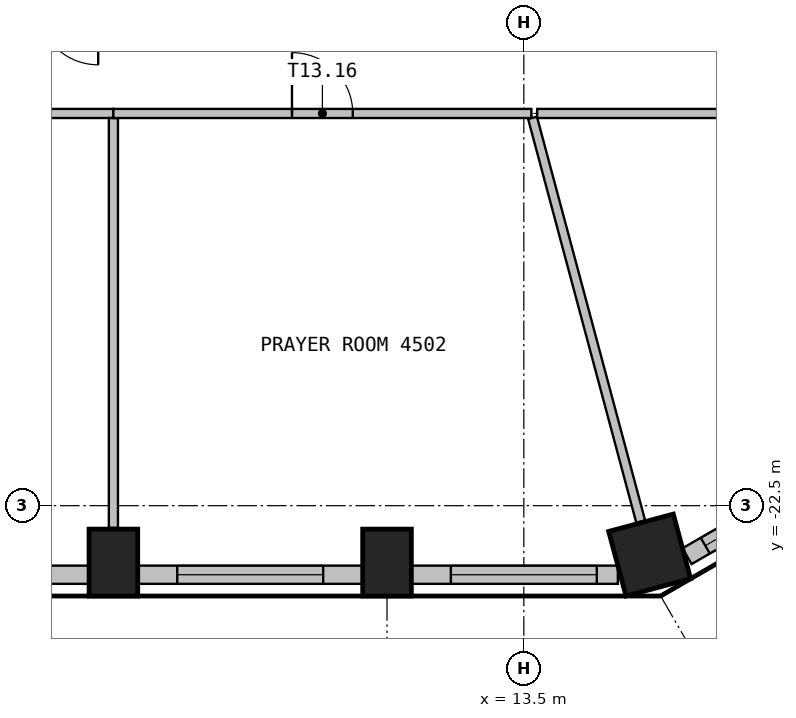
"""IFC4 building model, lengths in metres.
Left out: names, types, materials, properties, quantities, classifications, styles, units other than length and angle.
Written with IfcOpenShell. Run it as: python <this file> out.ifc"""

import sys

from ifc_helpers import new_model, si_unit, direction, frame, frame_2d, origin, origin_2d, place, context, subcontext, project, spatial, rectangle, extrude, element, fill, save


model = new_model("IFC4")
c1 = context("Model", 3, precision=1e-05, world=origin(), true_north=direction((0.0, 1.0)))
c2 = subcontext(c1, "Body", "Model", "MODEL_VIEW")
j1 = project(units=[si_unit("LENGTHUNIT", "METRE"), si_unit("PLANEANGLEUNIT", "RADIAN")], contexts=[c1])
p1 = place(None, origin())
s1 = spatial("IfcSite", under=j1, at=p1, CompositionType="ELEMENT")
p2 = place(p1, origin())
s2 = spatial("IfcBuilding", under=s1, at=p2, CompositionType="ELEMENT")
p3 = place(p2, frame((0.0, 0.0, 183.9)))
s3 = spatial("IfcBuildingStorey", under=s2, at=p3, CompositionType="ELEMENT", Elevation=183.9)
for number, where, z_axis, x_axis in (
    (1, (6.75, -23.436, 0.0), (0.0, 0.0, 1.0), (1.0, 0.0, 0.0)),
    (2, (11.25, -23.436, 0.0), (0.0, 0.0, 1.0), (1.0, 0.0, 0.0)),
):
    element("IfcColumn", number, at=place(p3, frame(where, z_axis=z_axis, x_axis=x_axis)), inside=s3, PredefinedType="COLUMN", context=c2, shape_type="SweptSolid", body=[
        extrude(rectangle(XDim=0.8, YDim=1.1, at=origin_2d()), origin(), (0.0, 0.0, 1.0), 3.55),
    ])
p4 = place(p3, frame((15.57, -23.312, 0.0), z_axis=(0.0, 0.0, 1.0), x_axis=(0.965925826289, 0.258819045103, 0.0)))
e3 = element("IfcColumn", 3, at=p4, inside=s3, PredefinedType="COLUMN", context=c2, shape_type="SweptSolid", body=[
    extrude(rectangle(XDim=1.1, YDim=1.1, at=origin_2d()), origin(), (0.0, 0.0, 1.0), 3.55),
])
p5 = place(p3, frame((2.65, -23.635, 0.0), z_axis=(0.0, 0.0, 1.0), x_axis=(1.0, 0.0, 0.0)))
e4 = element("IfcWall", 4, at=p5, inside=s3, PredefinedType="SOLIDWALL", context=c2, shape_type="SweptSolid", body=[
    extrude(rectangle(XDim=3.699, YDim=0.3, at=frame_2d((1.85, 0.0))), origin(), (0.0, 0.0, 1.0), 3.55),
])
p6 = place(p5, frame((0.649, 0.0, 0.9)))
e5 = element("IfcOpeningElement", 5, at=p6, cuts=e4, PredefinedType="OPENING", context=c2, shape_type="SweptSolid", body=[
    extrude(rectangle(XDim=2.4, YDim=2.1, at=frame_2d((1.2, 1.05))), frame((0.0, 0.16, 0.0), z_axis=(0.0, -1.0, 0.0), x_axis=(1.0, 0.0, 0.0)), (0.0, 0.0, 1.0), 0.32),
])
p7 = place(p3, frame((7.15, -23.635, 0.0), z_axis=(0.0, 0.0, 1.0), x_axis=(1.0, 0.0, 0.0)))
e6 = element("IfcWall", 6, at=p7, inside=s3, PredefinedType="SOLIDWALL", context=c2, shape_type="SweptSolid", body=[
    extrude(rectangle(XDim=3.699, YDim=0.3, at=frame_2d((1.85, 0.0))), origin(), (0.0, 0.0, 1.0), 3.55),
])
p8 = place(p7, frame((0.649, 0.0, 0.9)))
e7 = element("IfcOpeningElement", 7, at=p8, cuts=e6, PredefinedType="OPENING", context=c2, shape_type="SweptSolid", body=[
    extrude(rectangle(XDim=2.4, YDim=2.1, at=frame_2d((1.2, 1.05))), frame((0.0, 0.16, 0.0), z_axis=(0.0, -1.0, 0.0), x_axis=(1.0, 0.0, 0.0)), (0.0, 0.0, 1.0), 0.32),
])
p9 = place(p3, frame((11.65, -23.635, 0.0), z_axis=(0.0, 0.0, 1.0), x_axis=(1.0, 0.0, 0.0)))
e8 = element("IfcWall", 8, at=p9, inside=s3, PredefinedType="SOLIDWALL", context=c2, shape_type="SweptSolid", body=[
    extrude(rectangle(XDim=3.396, YDim=0.3, at=frame_2d((1.698, 0.0))), origin(), (0.0, 0.0, 1.0), 3.55),
])
p10 = place(p9, frame((0.649, 0.0, 0.9)))
e9 = element("IfcOpeningElement", 9, at=p10, cuts=e8, PredefinedType="OPENING", context=c2, shape_type="SweptSolid", body=[
    extrude(rectangle(XDim=2.4, YDim=2.1, at=frame_2d((1.2, 1.05))), frame((0.0, 0.16, 0.0), z_axis=(0.0, -1.0, 0.0), x_axis=(1.0, 0.0, 0.0)), (0.0, 0.0, 1.0), 0.32),
])
p11 = place(p3, frame((16.184, -23.331, 0.0), z_axis=(0.0, 0.0, 1.0), x_axis=(0.865994975416, 0.500052699777, 0.0)))
e10 = element("IfcWall", 10, at=p11, inside=s3, PredefinedType="SOLIDWALL", context=c2, shape_type="SweptSolid", body=[
    extrude(rectangle(XDim=3.093, YDim=0.3, at=frame_2d((1.546, 0.0))), origin(), (0.0, 0.0, 1.0), 3.55),
])
p12 = place(p11, frame((0.346, 0.0, 0.9)))
e11 = element("IfcOpeningElement", 11, at=p12, cuts=e10, PredefinedType="OPENING", context=c2, shape_type="SweptSolid", body=[
    extrude(rectangle(XDim=2.4, YDim=2.1, at=frame_2d((1.2, 1.05))), frame((0.0, 0.16, 0.0), z_axis=(0.0, -1.0, 0.0), x_axis=(1.0, 0.0, 0.0)), (0.0, 0.0, 1.0), 0.32),
])
p13 = place(p3, frame((-11.25, -16.05, 0.0), z_axis=(0.0, 0.0, 1.0), x_axis=(1.0, 0.0, 0.0)))
e12 = element("IfcWall", 12, at=p13, inside=s3, PredefinedType="PARTITIONING", context=c2, shape_type="SweptSolid", body=[
    extrude(rectangle(XDim=18.0, YDim=0.15, at=frame_2d((9.0, 0.0))), origin(), (0.0, 0.0, 1.0), 3.55),
])
p14 = place(p13, frame((8.5, 0.0, 0.0)))
e13 = element("IfcOpeningElement", 13, at=p14, cuts=e12, PredefinedType="OPENING", context=c2, shape_type="SweptSolid", body=[
    extrude(rectangle(XDim=1.0, YDim=2.1, at=frame_2d((0.5, 1.05))), frame((0.0, 0.085, 0.0), z_axis=(0.0, -1.0, 0.0), x_axis=(1.0, 0.0, 0.0)), (0.0, 0.0, 1.0), 0.17),
])
p15 = place(p3, frame((6.75, -16.125, 0.0), z_axis=(0.0, 0.0, 1.0), x_axis=(0.0, -1.0, 0.0)))
e14 = element("IfcWall", 14, at=p15, inside=s3, PredefinedType="PARTITIONING", context=c2, shape_type="SweptSolid", body=[
    extrude(rectangle(XDim=6.74, YDim=0.15, at=frame_2d((3.37, 0.0))), origin(), (0.0, 0.0, 1.0), 3.55),
])
p16 = place(p3, frame((6.75, -16.05, 0.0), z_axis=(0.0, 0.0, 1.0), x_axis=(1.0, 0.0, 0.0)))
e15 = element("IfcWall", 15, at=p16, inside=s3, PredefinedType="PARTITIONING", context=c2, shape_type="SweptSolid", body=[
    extrude(rectangle(XDim=6.874, YDim=0.15, at=frame_2d((3.437, 0.0))), origin(), (0.0, 0.0, 1.0), 3.55),
])
p17 = place(p16, frame((2.937, 0.0, 0.0)))
e16 = element("IfcOpeningElement", 16, at=p17, cuts=e15, PredefinedType="OPENING", context=c2, shape_type="SweptSolid", body=[
    extrude(rectangle(XDim=1.0, YDim=2.1, at=frame_2d((0.5, 1.05))), frame((0.0, 0.085, 0.0), z_axis=(0.0, -1.0, 0.0), x_axis=(1.0, 0.0, 0.0)), (0.0, 0.0, 1.0), 0.17),
])
p18 = place(p3, frame((13.643, -16.122, 0.0), z_axis=(0.0, 0.0, 1.0), x_axis=(0.258807697684, -0.965928866749, 0.0)))
e17 = element("IfcWall", 17, at=p18, inside=s3, PredefinedType="PARTITIONING", context=c2, shape_type="SweptSolid", body=[
    extrude(rectangle(XDim=6.873, YDim=0.15, at=frame_2d((3.437, 0.0))), origin(), (0.0, 0.0, 1.0), 3.55),
])
p19 = place(p3, frame((13.719, -16.05, 0.0), z_axis=(0.0, 0.0, 1.0), x_axis=(1.0, 0.0, 0.0)))
e18 = element("IfcWall", 18, at=p19, inside=s3, PredefinedType="PARTITIONING", context=c2, shape_type="SweptSolid", body=[
    extrude(rectangle(XDim=4.656, YDim=0.15, at=frame_2d((2.328, 0.0))), origin(), (0.0, 0.0, 1.0), 3.55),
])
p20 = place(p8, origin())
e19 = element("IfcWindow", 19, at=p20, inside=s3, PartitioningType="SINGLE_PANEL", PredefinedType="WINDOW", context=c2, shape_type="SweptSolid", body=[
    extrude(rectangle(XDim=2.4, YDim=2.1, at=frame_2d((1.2, 1.05))), frame((0.0, 0.03, 0.0), z_axis=(0.0, -1.0, 0.0), x_axis=(1.0, 0.0, 0.0)), (0.0, 0.0, 1.0), 0.06),
])
fill(e7, e19)
p21 = place(p10, origin())
e20 = element("IfcWindow", 20, at=p21, inside=s3, PartitioningType="SINGLE_PANEL", PredefinedType="WINDOW", context=c2, shape_type="SweptSolid", body=[
    extrude(rectangle(XDim=2.4, YDim=2.1, at=frame_2d((1.2, 1.05))), frame((0.0, 0.03, 0.0), z_axis=(0.0, -1.0, 0.0), x_axis=(1.0, 0.0, 0.0)), (0.0, 0.0, 1.0), 0.06),
])
fill(e9, e20)
p22 = place(p12, origin())
e21 = element("IfcWindow", 21, at=p22, inside=s3, PartitioningType="SINGLE_PANEL", PredefinedType="WINDOW", context=c2, shape_type="SweptSolid", body=[
    extrude(rectangle(XDim=2.4, YDim=2.1, at=frame_2d((1.2, 1.05))), frame((0.0, 0.03, 0.0), z_axis=(0.0, -1.0, 0.0), x_axis=(1.0, 0.0, 0.0)), (0.0, 0.0, 1.0), 0.06),
])
fill(e11, e21)
p23 = place(p17, origin())
e22 = element("IfcDoor", 22, at=p23, inside=s3, OperationType="SINGLE_SWING_LEFT", PredefinedType="DOOR", context=c2, shape_type="SweptSolid", body=[
    extrude(rectangle(XDim=1.0, YDim=2.1, at=frame_2d((0.5, 1.05))), frame((0.0, 0.025, 0.0), z_axis=(0.0, -1.0, 0.0), x_axis=(1.0, 0.0, 0.0)), (0.0, 0.0, 1.0), 0.05),
])
fill(e16, e22)
save(model, sys.argv[1])
